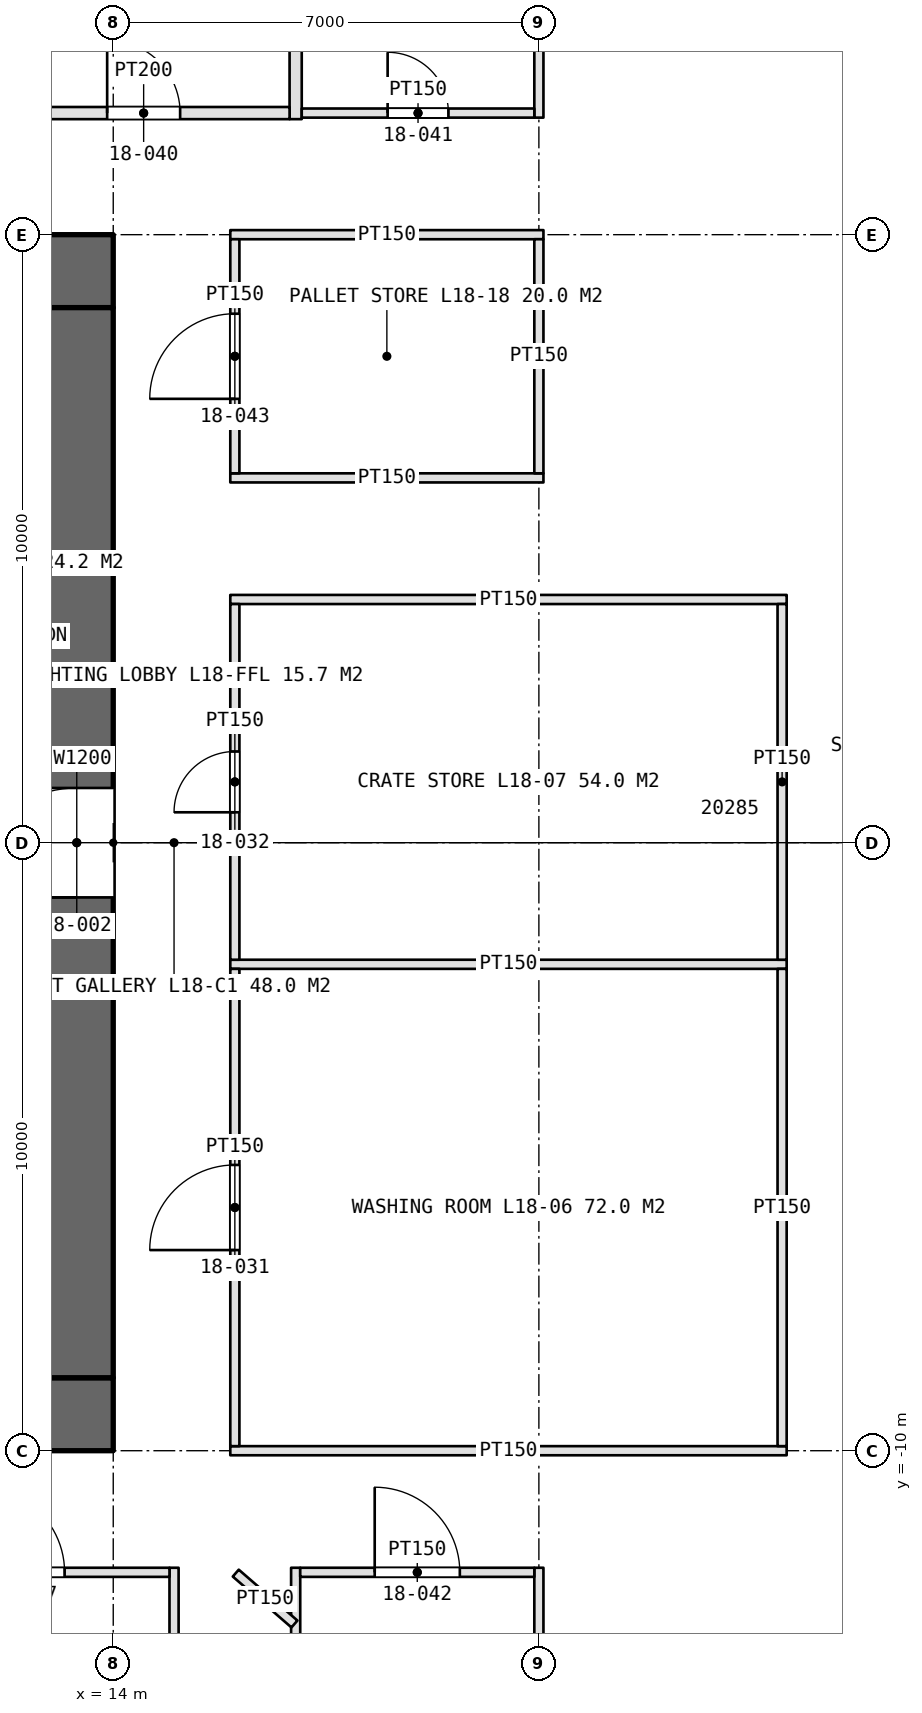
"""IFC4 building model, lengths in metres.
Left out: names, types, materials, properties, quantities, classifications, styles, units other than length and angle.
Written with IfcOpenShell. Run it as: python <this file> out.ifc"""

import sys

from ifc_helpers import new_model, si_unit, direction, frame, frame_2d, origin, place, context, subcontext, project, spatial, rectangle, extrude, element, fill, save


model = new_model("IFC4")
c1 = context("Model", 3, precision=1e-05, world=origin(), true_north=direction((0.0, 1.0)))
c2 = subcontext(c1, "Body", "Model", "MODEL_VIEW")
j1 = project(units=[si_unit("LENGTHUNIT", "METRE"), si_unit("PLANEANGLEUNIT", "RADIAN")], contexts=[c1])
p1 = place(None, origin())
s1 = spatial("IfcSite", under=j1, at=p1, CompositionType="ELEMENT")
p2 = place(p1, origin())
s2 = spatial("IfcBuilding", under=s1, at=p2, CompositionType="ELEMENT")
p3 = place(p2, frame((0.0, 0.0, 90.0)))
s3 = spatial("IfcBuildingStorey", under=s2, at=p3, CompositionType="ELEMENT", Elevation=90.0)
p4 = place(p3, frame((-14.0, -9.4, 0.0), z_axis=(0.0, 0.0, 1.0), x_axis=(1.0, 0.0, 0.0)))
e1 = element("IfcWall", 1, at=p4, inside=s3, PredefinedType="SHEAR", context=c2, shape_type="SweptSolid", body=[
    extrude(rectangle(XDim=28.0, YDim=1.2, at=frame_2d((14.0, 0.0))), origin(), (0.0, 0.0, 1.0), 5.0),
])
p5 = place(p4, frame((13.1, 0.0, 0.0)))
e2 = element("IfcOpeningElement", 2, at=p5, cuts=e1, PredefinedType="OPENING", context=c2, shape_type="SweptSolid", body=[
    extrude(rectangle(XDim=1.8, YDim=2.4, at=frame_2d((0.9, 1.2))), frame((0.0, 0.61, 0.0), z_axis=(0.0, -1.0, 0.0), x_axis=(1.0, 0.0, 0.0)), (0.0, 0.0, 1.0), 1.22),
])
p6 = place(p4, frame((22.9, 0.0, 0.0)))
e3 = element("IfcOpeningElement", 3, at=p6, cuts=e1, PredefinedType="OPENING", context=c2, shape_type="SweptSolid", body=[
    extrude(rectangle(XDim=2.2, YDim=2.7, at=frame_2d((1.1, 1.35))), frame((0.0, 0.61, 0.0), z_axis=(0.0, -1.0, 0.0), x_axis=(1.0, 0.0, 0.0)), (0.0, 0.0, 1.0), 1.22),
])
p7 = place(p3, frame((14.0, 9.4, 0.0), z_axis=(0.0, 0.0, 1.0), x_axis=(-1.0, 0.0, 0.0)))
e4 = element("IfcWall", 4, at=p7, inside=s3, PredefinedType="SHEAR", context=c2, shape_type="SweptSolid", body=[
    extrude(rectangle(XDim=28.0, YDim=1.2, at=frame_2d((14.0, 0.0))), origin(), (0.0, 0.0, 1.0), 5.0),
])
p8 = place(p7, frame((24.0, 0.0, 0.0)))
e5 = element("IfcOpeningElement", 5, at=p8, cuts=e4, PredefinedType="OPENING", context=c2, shape_type="SweptSolid", body=[
    extrude(rectangle(XDim=1.0, YDim=2.4, at=frame_2d((0.5, 1.2))), frame((0.0, 0.61, 0.0), z_axis=(0.0, -1.0, 0.0), x_axis=(1.0, 0.0, 0.0)), (0.0, 0.0, 1.0), 1.22),
])
p9 = place(p7, frame((13.1, 0.0, 0.0)))
e6 = element("IfcOpeningElement", 6, at=p9, cuts=e4, PredefinedType="OPENING", context=c2, shape_type="SweptSolid", body=[
    extrude(rectangle(XDim=1.8, YDim=2.4, at=frame_2d((0.9, 1.2))), frame((0.0, 0.61, 0.0), z_axis=(0.0, -1.0, 0.0), x_axis=(1.0, 0.0, 0.0)), (0.0, 0.0, 1.0), 1.22),
])
p10 = place(p3, frame((13.4, -8.8, 0.0), z_axis=(0.0, 0.0, 1.0), x_axis=(0.0, 1.0, 0.0)))
e7 = element("IfcWall", 7, at=p10, inside=s3, PredefinedType="SHEAR", context=c2, shape_type="SweptSolid", body=[
    extrude(rectangle(XDim=17.6, YDim=1.2, at=frame_2d((8.8, 0.0))), origin(), (0.0, 0.0, 1.0), 5.0),
])
p11 = place(p10, frame((7.9, 0.0, 0.0)))
e8 = element("IfcOpeningElement", 8, at=p11, cuts=e7, PredefinedType="OPENING", context=c2, shape_type="SweptSolid", body=[
    extrude(rectangle(XDim=1.8, YDim=2.4, at=frame_2d((0.9, 1.2))), frame((0.0, 0.61, 0.0), z_axis=(0.0, -1.0, 0.0), x_axis=(1.0, 0.0, 0.0)), (0.0, 0.0, 1.0), 1.22),
])
p12 = place(p3, frame((15.0, -11.925, 0.0), z_axis=(0.0, 0.0, 1.0), x_axis=(0.0, -1.0, 0.0)))
e9 = element("IfcWall", 9, at=p12, inside=s3, PredefinedType="PARTITIONING", context=c2, shape_type="SweptSolid", body=[
    extrude(rectangle(XDim=8.15, YDim=0.15, at=frame_2d((4.075, 0.0))), origin(), (0.0, 0.0, 1.0), 3.6),
])
p13 = place(p3, frame((10.075, -12.0, 0.0), z_axis=(0.0, 0.0, 1.0), x_axis=(1.0, 0.0, 0.0)))
e10 = element("IfcWall", 10, at=p13, inside=s3, PredefinedType="PARTITIONING", context=c2, shape_type="SweptSolid", body=[
    extrude(rectangle(XDim=4.85, YDim=0.15, at=frame_2d((2.425, 0.0))), origin(), (0.0, 0.0, 1.0), 3.6),
])
p14 = place(p13, frame((1.725, 0.0, 0.0)))
e11 = element("IfcOpeningElement", 11, at=p14, cuts=e10, PredefinedType="OPENING", context=c2, shape_type="SweptSolid", body=[
    extrude(rectangle(XDim=1.4, YDim=2.4, at=frame_2d((0.7, 1.2))), frame((0.0, 0.085, 0.0), z_axis=(0.0, -1.0, 0.0), x_axis=(1.0, 0.0, 0.0)), (0.0, 0.0, 1.0), 0.17),
])
for number, where, z_axis, x_axis in (
    (12, (15.925, -10.0, 0.0), (0.0, 0.0, 1.0), (1.0, 0.0, 0.0)),
    (13, (15.925, -2.0, 0.0), (0.0, 0.0, 1.0), (1.0, 0.0, 0.0)),
    (14, (15.925, 4.0, 0.0), (0.0, 0.0, 1.0), (1.0, 0.0, 0.0)),
):
    element("IfcWall", number, at=place(p3, frame(where, z_axis=z_axis, x_axis=x_axis)), inside=s3, PredefinedType="PARTITIONING", context=c2, shape_type="SweptSolid", body=[
        extrude(rectangle(XDim=9.15, YDim=0.15, at=frame_2d((4.575, 0.0))), origin(), (0.0, 0.0, 1.0), 3.6),
    ])
p15 = place(p3, frame((16.0, -9.925, 0.0), z_axis=(0.0, 0.0, 1.0), x_axis=(0.0, 1.0, 0.0)))
e15 = element("IfcWall", 15, at=p15, inside=s3, PredefinedType="PARTITIONING", context=c2, shape_type="SweptSolid", body=[
    extrude(rectangle(XDim=7.85, YDim=0.15, at=frame_2d((3.925, 0.0))), origin(), (0.0, 0.0, 1.0), 3.6),
])
p16 = place(p15, frame((3.225, 0.0, 0.0)))
e16 = element("IfcOpeningElement", 16, at=p16, cuts=e15, PredefinedType="OPENING", context=c2, shape_type="SweptSolid", body=[
    extrude(rectangle(XDim=1.4, YDim=2.4, at=frame_2d((0.7, 1.2))), frame((0.0, 0.085, 0.0), z_axis=(0.0, -1.0, 0.0), x_axis=(1.0, 0.0, 0.0)), (0.0, 0.0, 1.0), 0.17),
])
p17 = place(p3, frame((25.0, -9.925, 0.0), z_axis=(0.0, 0.0, 1.0), x_axis=(0.0, 1.0, 0.0)))
e17 = element("IfcWall", 17, at=p17, inside=s3, PredefinedType="PARTITIONING", context=c2, shape_type="SweptSolid", body=[
    extrude(rectangle(XDim=7.85, YDim=0.15, at=frame_2d((3.925, 0.0))), origin(), (0.0, 0.0, 1.0), 3.6),
])
p18 = place(p3, frame((16.0, -1.925, 0.0), z_axis=(0.0, 0.0, 1.0), x_axis=(0.0, 1.0, 0.0)))
e18 = element("IfcWall", 18, at=p18, inside=s3, PredefinedType="PARTITIONING", context=c2, shape_type="SweptSolid", body=[
    extrude(rectangle(XDim=5.85, YDim=0.15, at=frame_2d((2.925, 0.0))), origin(), (0.0, 0.0, 1.0), 3.6),
])
p19 = place(p18, frame((2.425, 0.0, 0.0)))
e19 = element("IfcOpeningElement", 19, at=p19, cuts=e18, PredefinedType="OPENING", context=c2, shape_type="SweptSolid", body=[
    extrude(rectangle(XDim=1.0, YDim=2.2, at=frame_2d((0.5, 1.1))), frame((0.0, 0.085, 0.0), z_axis=(0.0, -1.0, 0.0), x_axis=(1.0, 0.0, 0.0)), (0.0, 0.0, 1.0), 0.17),
])
p20 = place(p3, frame((25.0, -1.925, 0.0), z_axis=(0.0, 0.0, 1.0), x_axis=(0.0, 1.0, 0.0)))
e20 = element("IfcWall", 20, at=p20, inside=s3, PredefinedType="PARTITIONING", context=c2, shape_type="SweptSolid", body=[
    extrude(rectangle(XDim=5.85, YDim=0.15, at=frame_2d((2.925, 0.0))), origin(), (0.0, 0.0, 1.0), 3.6),
])
p21 = place(p3, frame((17.0, 11.9, 0.0), z_axis=(0.0, 0.0, 1.0), x_axis=(0.0, 1.0, 0.0)))
e21 = element("IfcWall", 21, at=p21, inside=s3, PredefinedType="PARTITIONING", context=c2, shape_type="SweptSolid", body=[
    extrude(rectangle(XDim=5.2, YDim=0.2, at=frame_2d((2.6, 0.0))), origin(), (0.0, 0.0, 1.0), 3.6),
])
p22 = place(p3, frame((21.0, 11.925, 0.0), z_axis=(0.0, 0.0, 1.0), x_axis=(0.0, 1.0, 0.0)))
e22 = element("IfcWall", 22, at=p22, inside=s3, PredefinedType="PARTITIONING", context=c2, shape_type="SweptSolid", body=[
    extrude(rectangle(XDim=5.15, YDim=0.15, at=frame_2d((2.575, 0.0))), origin(), (0.0, 0.0, 1.0), 3.6),
])
p23 = place(p3, frame((12.1, 12.0, 0.0), z_axis=(0.0, 0.0, 1.0), x_axis=(1.0, 0.0, 0.0)))
e23 = element("IfcWall", 23, at=p23, inside=s3, PredefinedType="PARTITIONING", context=c2, shape_type="SweptSolid", body=[
    extrude(rectangle(XDim=4.8, YDim=0.2, at=frame_2d((2.4, 0.0))), origin(), (0.0, 0.0, 1.0), 3.6),
])
p24 = place(p23, frame((1.8, 0.0, 0.0)))
e24 = element("IfcOpeningElement", 24, at=p24, cuts=e23, PredefinedType="OPENING", context=c2, shape_type="SweptSolid", body=[
    extrude(rectangle(XDim=1.2, YDim=2.4, at=frame_2d((0.6, 1.2))), frame((0.0, 0.11, 0.0), z_axis=(0.0, -1.0, 0.0), x_axis=(1.0, 0.0, 0.0)), (0.0, 0.0, 1.0), 0.22),
])
p25 = place(p3, frame((17.1, 12.0, 0.0), z_axis=(0.0, 0.0, 1.0), x_axis=(1.0, 0.0, 0.0)))
e25 = element("IfcWall", 25, at=p25, inside=s3, PredefinedType="PARTITIONING", context=c2, shape_type="SweptSolid", body=[
    extrude(rectangle(XDim=3.825, YDim=0.15, at=frame_2d((1.913, 0.0))), origin(), (0.0, 0.0, 1.0), 3.6),
])
p26 = place(p25, frame((1.413, 0.0, 0.0)))
e26 = element("IfcOpeningElement", 26, at=p26, cuts=e25, PredefinedType="OPENING", context=c2, shape_type="SweptSolid", body=[
    extrude(rectangle(XDim=1.0, YDim=2.2, at=frame_2d((0.5, 1.1))), frame((0.0, 0.085, 0.0), z_axis=(0.0, -1.0, 0.0), x_axis=(1.0, 0.0, 0.0)), (0.0, 0.0, 1.0), 0.17),
])
for number, where, z_axis, x_axis in (
    (27, (17.0, -11.925, 0.0), (0.0, 0.0, 1.0), (0.0, -1.0, 0.0)),
    (28, (21.0, -11.925, 0.0), (0.0, 0.0, 1.0), (0.0, -1.0, 0.0)),
):
    element("IfcWall", number, at=place(p3, frame(where, z_axis=z_axis, x_axis=x_axis)), inside=s3, PredefinedType="PARTITIONING", context=c2, shape_type="SweptSolid", body=[
        extrude(rectangle(XDim=5.15, YDim=0.15, at=frame_2d((2.575, 0.0))), origin(), (0.0, 0.0, 1.0), 3.6),
    ])
p27 = place(p3, frame((17.075, -12.0, 0.0), z_axis=(0.0, 0.0, 1.0), x_axis=(1.0, 0.0, 0.0)))
e29 = element("IfcWall", 29, at=p27, inside=s3, PredefinedType="PARTITIONING", context=c2, shape_type="SweptSolid", body=[
    extrude(rectangle(XDim=3.85, YDim=0.15, at=frame_2d((1.925, 0.0))), origin(), (0.0, 0.0, 1.0), 3.6),
])
p28 = place(p27, frame((1.225, 0.0, 0.0)))
e30 = element("IfcOpeningElement", 30, at=p28, cuts=e29, PredefinedType="OPENING", context=c2, shape_type="SweptSolid", body=[
    extrude(rectangle(XDim=1.4, YDim=2.4, at=frame_2d((0.7, 1.2))), frame((0.0, 0.085, 0.0), z_axis=(0.0, -1.0, 0.0), x_axis=(1.0, 0.0, 0.0)), (0.0, 0.0, 1.0), 0.17),
])
for number, where, z_axis, x_axis in (
    (31, (15.925, 6.0, 0.0), (0.0, 0.0, 1.0), (1.0, 0.0, 0.0)),
    (32, (15.925, 10.0, 0.0), (0.0, 0.0, 1.0), (1.0, 0.0, 0.0)),
):
    element("IfcWall", number, at=place(p3, frame(where, z_axis=z_axis, x_axis=x_axis)), inside=s3, PredefinedType="PARTITIONING", context=c2, shape_type="SweptSolid", body=[
        extrude(rectangle(XDim=5.15, YDim=0.15, at=frame_2d((2.575, 0.0))), origin(), (0.0, 0.0, 1.0), 3.6),
    ])
p29 = place(p3, frame((16.0, 6.075, 0.0), z_axis=(0.0, 0.0, 1.0), x_axis=(0.0, 1.0, 0.0)))
e33 = element("IfcWall", 33, at=p29, inside=s3, PredefinedType="PARTITIONING", context=c2, shape_type="SweptSolid", body=[
    extrude(rectangle(XDim=3.85, YDim=0.15, at=frame_2d((1.925, 0.0))), origin(), (0.0, 0.0, 1.0), 3.6),
])
p30 = place(p29, frame((1.225, 0.0, 0.0)))
e34 = element("IfcOpeningElement", 34, at=p30, cuts=e33, PredefinedType="OPENING", context=c2, shape_type="SweptSolid", body=[
    extrude(rectangle(XDim=1.4, YDim=2.4, at=frame_2d((0.7, 1.2))), frame((0.0, 0.085, 0.0), z_axis=(0.0, -1.0, 0.0), x_axis=(1.0, 0.0, 0.0)), (0.0, 0.0, 1.0), 0.17),
])
p31 = place(p3, frame((21.0, 6.075, 0.0), z_axis=(0.0, 0.0, 1.0), x_axis=(0.0, 1.0, 0.0)))
e35 = element("IfcWall", 35, at=p31, inside=s3, PredefinedType="PARTITIONING", context=c2, shape_type="SweptSolid", body=[
    extrude(rectangle(XDim=3.85, YDim=0.15, at=frame_2d((1.925, 0.0))), origin(), (0.0, 0.0, 1.0), 3.6),
])
p32 = place(p3, frame((16.015, -12.013, 0.0), z_axis=(0.0, 0.0, 1.0), x_axis=(0.755411512729, -0.655250674503, 0.0)))
e36 = element("IfcWall", 36, at=p32, inside=s3, PredefinedType="PARTITIONING", context=c2, shape_type="SweptSolid", body=[
    extrude(rectangle(XDim=1.277, YDim=0.15, at=frame_2d((0.639, 0.0))), origin(), (0.0, 0.0, 1.0), 3.6),
])
p33 = place(p11, origin())
e37 = element("IfcDoor", 37, at=p33, inside=s3, OperationType="DOUBLE_DOOR_SINGLE_SWING", PredefinedType="DOOR", context=c2, shape_type="SweptSolid", body=[
    extrude(rectangle(XDim=1.8, YDim=2.4, at=frame_2d((0.9, 1.2))), frame((0.0, 0.025, 0.0), z_axis=(0.0, -1.0, 0.0), x_axis=(1.0, 0.0, 0.0)), (0.0, 0.0, 1.0), 0.05),
])
fill(e8, e37)
p34 = place(p14, origin())
e38 = element("IfcDoor", 38, at=p34, inside=s3, OperationType="DOUBLE_DOOR_DOUBLE_SWING", PredefinedType="DOOR", context=c2, shape_type="SweptSolid", body=[
    extrude(rectangle(XDim=1.4, YDim=2.4, at=frame_2d((0.7, 1.2))), frame((0.0, 0.025, 0.0), z_axis=(0.0, -1.0, 0.0), x_axis=(1.0, 0.0, 0.0)), (0.0, 0.0, 1.0), 0.05),
])
fill(e11, e38)
p35 = place(p16, origin())
e39 = element("IfcDoor", 39, at=p35, inside=s3, OperationType="DOUBLE_DOOR_DOUBLE_SWING", PredefinedType="DOOR", context=c2, shape_type="SweptSolid", body=[
    extrude(rectangle(XDim=1.4, YDim=2.4, at=frame_2d((0.7, 1.2))), frame((0.0, 0.025, 0.0), z_axis=(0.0, -1.0, 0.0), x_axis=(1.0, 0.0, 0.0)), (0.0, 0.0, 1.0), 0.05),
])
fill(e16, e39)
p36 = place(p19, origin())
e40 = element("IfcDoor", 40, at=p36, inside=s3, OperationType="SINGLE_SWING_LEFT", PredefinedType="DOOR", context=c2, shape_type="SweptSolid", body=[
    extrude(rectangle(XDim=1.0, YDim=2.2, at=frame_2d((0.5, 1.1))), frame((0.0, 0.025, 0.0), z_axis=(0.0, -1.0, 0.0), x_axis=(1.0, 0.0, 0.0)), (0.0, 0.0, 1.0), 0.05),
])
fill(e19, e40)
p37 = place(p24, origin())
e41 = element("IfcDoor", 41, at=p37, inside=s3, OperationType="SINGLE_SWING_LEFT", PredefinedType="DOOR", context=c2, shape_type="SweptSolid", body=[
    extrude(rectangle(XDim=1.2, YDim=2.4, at=frame_2d((0.6, 1.2))), frame((0.0, 0.025, 0.0), z_axis=(0.0, -1.0, 0.0), x_axis=(1.0, 0.0, 0.0)), (0.0, 0.0, 1.0), 0.05),
])
fill(e24, e41)
p38 = place(p26, origin())
e42 = element("IfcDoor", 42, at=p38, inside=s3, OperationType="SINGLE_SWING_LEFT", PredefinedType="DOOR", context=c2, shape_type="SweptSolid", body=[
    extrude(rectangle(XDim=1.0, YDim=2.2, at=frame_2d((0.5, 1.1))), frame((0.0, 0.025, 0.0), z_axis=(0.0, -1.0, 0.0), x_axis=(1.0, 0.0, 0.0)), (0.0, 0.0, 1.0), 0.05),
])
fill(e26, e42)
p39 = place(p28, origin())
e43 = element("IfcDoor", 43, at=p39, inside=s3, OperationType="DOUBLE_DOOR_DOUBLE_SWING", PredefinedType="DOOR", context=c2, shape_type="SweptSolid", body=[
    extrude(rectangle(XDim=1.4, YDim=2.4, at=frame_2d((0.7, 1.2))), frame((0.0, 0.025, 0.0), z_axis=(0.0, -1.0, 0.0), x_axis=(1.0, 0.0, 0.0)), (0.0, 0.0, 1.0), 0.05),
])
fill(e30, e43)
p40 = place(p30, origin())
e44 = element("IfcDoor", 44, at=p40, inside=s3, OperationType="DOUBLE_DOOR_DOUBLE_SWING", PredefinedType="DOOR", context=c2, shape_type="SweptSolid", body=[
    extrude(rectangle(XDim=1.4, YDim=2.4, at=frame_2d((0.7, 1.2))), frame((0.0, 0.025, 0.0), z_axis=(0.0, -1.0, 0.0), x_axis=(1.0, 0.0, 0.0)), (0.0, 0.0, 1.0), 0.05),
])
fill(e34, e44)
save(model, sys.argv[1])
